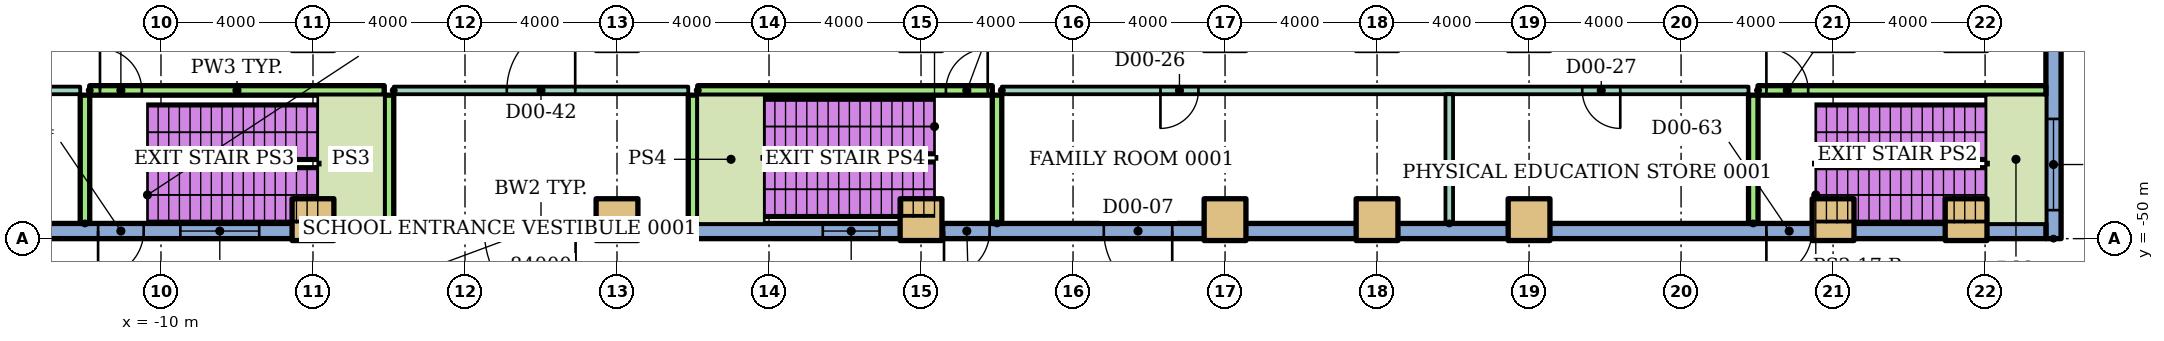
"""IFC4 building model, lengths in metres.
Left out: names, types, materials, properties, quantities, classifications, styles, units other than length and angle.
Written with IfcOpenShell. Run it as: python <this file> out.ifc"""

import sys

from ifc_helpers import new_model, si_unit, direction, frame, frame_2d, origin, origin_2d, place, context, subcontext, project, spatial, rectangle, extrude, element, fill, save


model = new_model("IFC4")
c1 = context("Model", 3, precision=1e-05, world=origin(), true_north=direction((0.0, 1.0)))
c2 = subcontext(c1, "Body", "Model", "MODEL_VIEW")
j1 = project(units=[si_unit("LENGTHUNIT", "METRE"), si_unit("PLANEANGLEUNIT", "RADIAN")], contexts=[c1])
p1 = place(None, origin())
s1 = spatial("IfcSite", under=j1, at=p1, CompositionType="ELEMENT")
p2 = place(p1, origin())
s2 = spatial("IfcBuilding", under=s1, at=p2, CompositionType="ELEMENT")
p3 = place(p2, origin())
s3 = spatial("IfcBuildingStorey", under=s2, at=p3, CompositionType="ELEMENT", Elevation=0.0)
for number, where in (
    (1, (-6.0, -49.5, 0.0)),
    (2, (2.0, -49.5, 0.0)),
    (3, (10.0, -49.5, 0.0)),
    (4, (18.0, -49.5, 0.0)),
    (5, (22.0, -49.5, 0.0)),
    (6, (26.0, -49.5, 0.0)),
    (7, (34.0, -49.5, 0.0)),
    (8, (37.5, -49.5, 0.0)),
):
    element("IfcColumn", number, at=place(p3, frame(where)), inside=s3, PredefinedType="COLUMN", context=c2, shape_type="SweptSolid", body=[
        extrude(rectangle(XDim=1.1, YDim=1.1, at=origin_2d()), origin(), (0.0, 0.0, 1.0), 6.0),
    ])
p4 = place(p3, frame((39.8, -50.0, 0.0), z_axis=(0.0, 0.0, 1.0), x_axis=(0.0, 1.0, 0.0)))
e9 = element("IfcWall", 9, at=p4, inside=s3, PredefinedType="STANDARD", context=c2, shape_type="SweptSolid", body=[
    extrude(rectangle(XDim=70.0, YDim=0.4, at=frame_2d((35.0, 0.0))), origin(), (0.0, 0.0, 1.0), 5.7),
])
p5 = place(p4, frame((17.933, 0.0, 0.0)))
e10 = element("IfcOpeningElement", 10, at=p5, cuts=e9, PredefinedType="OPENING", context=c2, shape_type="SweptSolid", body=[
    extrude(rectangle(XDim=1.8, YDim=2.4, at=frame_2d((0.9, 1.2))), frame((0.0, 0.21, 0.0), z_axis=(0.0, -1.0, 0.0), x_axis=(1.0, 0.0, 0.0)), (0.0, 0.0, 1.0), 0.42),
])
p6 = place(p4, frame((0.75, 0.0, 0.9)))
e11 = element("IfcOpeningElement", 11, at=p6, cuts=e9, PredefinedType="OPENING", context=c2, shape_type="SweptSolid", body=[
    extrude(rectangle(XDim=2.4, YDim=2.4, at=frame_2d((1.2, 1.2))), frame((0.0, 0.21, 0.0), z_axis=(0.0, -1.0, 0.0), x_axis=(1.0, 0.0, 0.0)), (0.0, 0.0, 1.0), 0.42),
])
p7 = place(p4, frame((21.3, 0.0, 0.9)))
e12 = element("IfcOpeningElement", 12, at=p7, cuts=e9, PredefinedType="OPENING", context=c2, shape_type="SweptSolid", body=[
    extrude(rectangle(XDim=2.4, YDim=2.4, at=frame_2d((1.2, 1.2))), frame((0.0, 0.21, 0.0), z_axis=(0.0, -1.0, 0.0), x_axis=(1.0, 0.0, 0.0)), (0.0, 0.0, 1.0), 0.42),
])
p8 = place(p4, frame((24.967, 0.0, 0.9)))
e13 = element("IfcOpeningElement", 13, at=p8, cuts=e9, PredefinedType="OPENING", context=c2, shape_type="SweptSolid", body=[
    extrude(rectangle(XDim=2.4, YDim=2.4, at=frame_2d((1.2, 1.2))), frame((0.0, 0.21, 0.0), z_axis=(0.0, -1.0, 0.0), x_axis=(1.0, 0.0, 0.0)), (0.0, 0.0, 1.0), 0.42),
])
p9 = place(p4, frame((32.988, 0.0, 0.9)))
e14 = element("IfcOpeningElement", 14, at=p9, cuts=e9, PredefinedType="OPENING", context=c2, shape_type="SweptSolid", body=[
    extrude(rectangle(XDim=2.4, YDim=2.4, at=frame_2d((1.2, 1.2))), frame((0.0, 0.21, 0.0), z_axis=(0.0, -1.0, 0.0), x_axis=(1.0, 0.0, 0.0)), (0.0, 0.0, 1.0), 0.42),
])
p10 = place(p4, frame((45.363, 0.0, 0.9)))
e15 = element("IfcOpeningElement", 15, at=p10, cuts=e9, PredefinedType="OPENING", context=c2, shape_type="SweptSolid", body=[
    extrude(rectangle(XDim=2.4, YDim=2.4, at=frame_2d((1.2, 1.2))), frame((0.0, 0.21, 0.0), z_axis=(0.0, -1.0, 0.0), x_axis=(1.0, 0.0, 0.0)), (0.0, 0.0, 1.0), 0.42),
])
p11 = place(p4, frame((49.488, 0.0, 0.9)))
e16 = element("IfcOpeningElement", 16, at=p11, cuts=e9, PredefinedType="OPENING", context=c2, shape_type="SweptSolid", body=[
    extrude(rectangle(XDim=2.4, YDim=2.4, at=frame_2d((1.2, 1.2))), frame((0.0, 0.21, 0.0), z_axis=(0.0, -1.0, 0.0), x_axis=(1.0, 0.0, 0.0)), (0.0, 0.0, 1.0), 0.42),
])
p12 = place(p4, frame((53.613, 0.0, 0.9)))
e17 = element("IfcOpeningElement", 17, at=p12, cuts=e9, PredefinedType="OPENING", context=c2, shape_type="SweptSolid", body=[
    extrude(rectangle(XDim=2.4, YDim=2.4, at=frame_2d((1.2, 1.2))), frame((0.0, 0.21, 0.0), z_axis=(0.0, -1.0, 0.0), x_axis=(1.0, 0.0, 0.0)), (0.0, 0.0, 1.0), 0.42),
])
p13 = place(p4, frame((57.738, 0.0, 0.9)))
e18 = element("IfcOpeningElement", 18, at=p13, cuts=e9, PredefinedType="OPENING", context=c2, shape_type="SweptSolid", body=[
    extrude(rectangle(XDim=2.4, YDim=2.4, at=frame_2d((1.2, 1.2))), frame((0.0, 0.21, 0.0), z_axis=(0.0, -1.0, 0.0), x_axis=(1.0, 0.0, 0.0)), (0.0, 0.0, 1.0), 0.42),
])
p14 = place(p4, frame((62.05, 0.0, 0.9)))
e19 = element("IfcOpeningElement", 19, at=p14, cuts=e9, PredefinedType="OPENING", context=c2, shape_type="SweptSolid", body=[
    extrude(rectangle(XDim=2.4, YDim=2.4, at=frame_2d((1.2, 1.2))), frame((0.0, 0.21, 0.0), z_axis=(0.0, -1.0, 0.0), x_axis=(1.0, 0.0, 0.0)), (0.0, 0.0, 1.0), 0.42),
])
p15 = place(p4, frame((66.55, 0.0, 0.9)))
e20 = element("IfcOpeningElement", 20, at=p15, cuts=e9, PredefinedType="OPENING", context=c2, shape_type="SweptSolid", body=[
    extrude(rectangle(XDim=2.4, YDim=2.4, at=frame_2d((1.2, 1.2))), frame((0.0, 0.21, 0.0), z_axis=(0.0, -1.0, 0.0), x_axis=(1.0, 0.0, 0.0)), (0.0, 0.0, 1.0), 0.42),
])
p16 = place(p4, frame((39.5, 0.0, 0.0)))
e21 = element("IfcOpeningElement", 21, at=p16, cuts=e9, PredefinedType="OPENING", context=c2, shape_type="SweptSolid", body=[
    extrude(rectangle(XDim=1.8, YDim=2.1, at=frame_2d((0.9, 1.05))), frame((0.0, 0.21, 0.0), z_axis=(0.0, -1.0, 0.0), x_axis=(1.0, 0.0, 0.0)), (0.0, 0.0, 1.0), 0.42),
])
p17 = place(p4, frame((28.3, 0.0, 0.0)))
e22 = element("IfcOpeningElement", 22, at=p17, cuts=e9, PredefinedType="OPENING", context=c2, shape_type="SweptSolid", body=[
    extrude(rectangle(XDim=1.8, YDim=2.1, at=frame_2d((0.9, 1.05))), frame((0.0, 0.21, 0.0), z_axis=(0.0, -1.0, 0.0), x_axis=(1.0, 0.0, 0.0)), (0.0, 0.0, 1.0), 0.42),
])
p18 = place(p3, frame((-39.6, -49.8, 0.0)))
e23 = element("IfcWall", 23, at=p18, inside=s3, PredefinedType="STANDARD", context=c2, shape_type="SweptSolid", body=[
    extrude(rectangle(XDim=79.2, YDim=0.4, at=frame_2d((39.6, 0.0))), origin(), (0.0, 0.0, 1.0), 5.7),
])
p19 = place(p18, frame((11.2, 0.0, 0.0)))
e24 = element("IfcOpeningElement", 24, at=p19, cuts=e23, PredefinedType="OPENING", context=c2, shape_type="SweptSolid", body=[
    extrude(rectangle(XDim=1.8, YDim=2.4, at=frame_2d((0.9, 1.2))), frame((0.0, 0.21, 0.0), z_axis=(0.0, -1.0, 0.0), x_axis=(1.0, 0.0, 0.0)), (0.0, 0.0, 1.0), 0.42),
])
p20 = place(p18, frame((38.11, 0.0, 0.0)))
e25 = element("IfcOpeningElement", 25, at=p20, cuts=e23, PredefinedType="OPENING", context=c2, shape_type="SweptSolid", body=[
    extrude(rectangle(XDim=2.4, YDim=2.4, at=frame_2d((1.2, 1.2))), frame((0.0, 0.21, 0.0), z_axis=(0.0, -1.0, 0.0), x_axis=(1.0, 0.0, 0.0)), (0.0, 0.0, 1.0), 0.42),
])
p21 = place(p18, frame((54.41, 0.0, 0.0)))
e26 = element("IfcOpeningElement", 26, at=p21, cuts=e23, PredefinedType="OPENING", context=c2, shape_type="SweptSolid", body=[
    extrude(rectangle(XDim=1.8, YDim=2.4, at=frame_2d((0.9, 1.2))), frame((0.0, 0.21, 0.0), z_axis=(0.0, -1.0, 0.0), x_axis=(1.0, 0.0, 0.0)), (0.0, 0.0, 1.0), 0.42),
])
p22 = place(p18, frame((22.11, 0.0, 0.9)))
e27 = element("IfcOpeningElement", 27, at=p22, cuts=e23, PredefinedType="OPENING", context=c2, shape_type="SweptSolid", body=[
    extrude(rectangle(XDim=2.4, YDim=2.4, at=frame_2d((1.2, 1.2))), frame((0.0, 0.21, 0.0), z_axis=(0.0, -1.0, 0.0), x_axis=(1.0, 0.0, 0.0)), (0.0, 0.0, 1.0), 0.42),
])
p23 = place(p18, frame((30.11, 0.0, 0.9)))
e28 = element("IfcOpeningElement", 28, at=p23, cuts=e23, PredefinedType="OPENING", context=c2, shape_type="SweptSolid", body=[
    extrude(rectangle(XDim=2.075, YDim=2.4, at=frame_2d((1.038, 1.2))), frame((0.0, 0.21, 0.0), z_axis=(0.0, -1.0, 0.0), x_axis=(1.0, 0.0, 0.0)), (0.0, 0.0, 1.0), 0.42),
])
p24 = place(p18, frame((47.015, 0.0, 0.9)))
e29 = element("IfcOpeningElement", 29, at=p24, cuts=e23, PredefinedType="OPENING", context=c2, shape_type="SweptSolid", body=[
    extrude(rectangle(XDim=1.495, YDim=2.4, at=frame_2d((0.748, 1.2))), frame((0.0, 0.21, 0.0), z_axis=(0.0, -1.0, 0.0), x_axis=(1.0, 0.0, 0.0)), (0.0, 0.0, 1.0), 0.42),
])
p25 = place(p18, frame((6.305, 0.0, 0.0)))
e30 = element("IfcOpeningElement", 30, at=p25, cuts=e23, PredefinedType="OPENING", context=c2, shape_type="SweptSolid", body=[
    extrude(rectangle(XDim=1.2, YDim=2.1, at=frame_2d((0.6, 1.05))), frame((0.0, 0.21, 0.0), z_axis=(0.0, -1.0, 0.0), x_axis=(1.0, 0.0, 0.0)), (0.0, 0.0, 1.0), 0.42),
])
p26 = place(p18, frame((71.845, 0.0, 0.0)))
e31 = element("IfcOpeningElement", 31, at=p26, cuts=e23, PredefinedType="OPENING", context=c2, shape_type="SweptSolid", body=[
    extrude(rectangle(XDim=1.2, YDim=2.1, at=frame_2d((0.6, 1.05))), frame((0.0, 0.21, 0.0), z_axis=(0.0, -1.0, 0.0), x_axis=(1.0, 0.0, 0.0)), (0.0, 0.0, 1.0), 0.42),
])
p27 = place(p18, frame((27.945, 0.0, 0.0)))
e32 = element("IfcOpeningElement", 32, at=p27, cuts=e23, PredefinedType="OPENING", context=c2, shape_type="SweptSolid", body=[
    extrude(rectangle(XDim=1.2, YDim=2.1, at=frame_2d((0.6, 1.05))), frame((0.0, 0.21, 0.0), z_axis=(0.0, -1.0, 0.0), x_axis=(1.0, 0.0, 0.0)), (0.0, 0.0, 1.0), 0.42),
])
p28 = place(p18, frame((50.205, 0.0, 0.0)))
e33 = element("IfcOpeningElement", 33, at=p28, cuts=e23, PredefinedType="OPENING", context=c2, shape_type="SweptSolid", body=[
    extrude(rectangle(XDim=1.2, YDim=2.1, at=frame_2d((0.6, 1.05))), frame((0.0, 0.21, 0.0), z_axis=(0.0, -1.0, 0.0), x_axis=(1.0, 0.0, 0.0)), (0.0, 0.0, 1.0), 0.42),
])
p29 = place(p3, frame((-31.775, -46.1, 0.0)))
e34 = element("IfcWall", 34, at=p29, inside=s3, PredefinedType="PARTITIONING", context=c2, shape_type="SweptSolid", body=[
    extrude(rectangle(XDim=19.65, YDim=0.2, at=frame_2d((9.825, 0.0))), origin(), (0.0, 0.0, 1.0), 5.7),
])
p30 = place(p29, frame((3.375, 0.0, 0.0)))
e35 = element("IfcOpeningElement", 35, at=p30, cuts=e34, PredefinedType="OPENING", context=c2, shape_type="SweptSolid", body=[
    extrude(rectangle(XDim=1.0, YDim=2.1, at=frame_2d((0.5, 1.05))), frame((0.0, 0.11, 0.0), z_axis=(0.0, -1.0, 0.0), x_axis=(1.0, 0.0, 0.0)), (0.0, 0.0, 1.0), 0.22),
])
p31 = place(p29, frame((13.325, 0.0, 0.0)))
e36 = element("IfcOpeningElement", 36, at=p31, cuts=e34, PredefinedType="OPENING", context=c2, shape_type="SweptSolid", body=[
    extrude(rectangle(XDim=1.0, YDim=2.1, at=frame_2d((0.5, 1.05))), frame((0.0, 0.11, 0.0), z_axis=(0.0, -1.0, 0.0), x_axis=(1.0, 0.0, 0.0)), (0.0, 0.0, 1.0), 0.22),
])
p32 = place(p3, frame((-3.875, -46.1, 0.0)))
e37 = element("IfcWall", 37, at=p32, inside=s3, PredefinedType="PARTITIONING", context=c2, shape_type="SweptSolid", body=[
    extrude(rectangle(XDim=7.75, YDim=0.2, at=frame_2d((3.875, 0.0))), origin(), (0.0, 0.0, 1.0), 5.7),
])
p33 = place(p32, frame((2.975, 0.0, 0.0)))
e38 = element("IfcOpeningElement", 38, at=p33, cuts=e37, PredefinedType="OPENING", context=c2, shape_type="SweptSolid", body=[
    extrude(rectangle(XDim=1.8, YDim=2.1, at=frame_2d((0.9, 1.05))), frame((0.0, 0.11, 0.0), z_axis=(0.0, -1.0, 0.0), x_axis=(1.0, 0.0, 0.0)), (0.0, 0.0, 1.0), 0.22),
])
p34 = place(p3, frame((12.125, -46.1, 0.0)))
e39 = element("IfcWall", 39, at=p34, inside=s3, PredefinedType="PARTITIONING", context=c2, shape_type="SweptSolid", body=[
    extrude(rectangle(XDim=19.65, YDim=0.2, at=frame_2d((9.825, 0.0))), origin(), (0.0, 0.0, 1.0), 5.7),
])
p35 = place(p34, frame((4.175, 0.0, 0.0)))
e40 = element("IfcOpeningElement", 40, at=p35, cuts=e39, PredefinedType="OPENING", context=c2, shape_type="SweptSolid", body=[
    extrude(rectangle(XDim=1.0, YDim=2.1, at=frame_2d((0.5, 1.05))), frame((0.0, 0.11, 0.0), z_axis=(0.0, -1.0, 0.0), x_axis=(1.0, 0.0, 0.0)), (0.0, 0.0, 1.0), 0.22),
])
p36 = place(p34, frame((15.275, 0.0, 0.0)))
e41 = element("IfcOpeningElement", 41, at=p36, cuts=e39, PredefinedType="OPENING", context=c2, shape_type="SweptSolid", body=[
    extrude(rectangle(XDim=1.0, YDim=2.1, at=frame_2d((0.5, 1.05))), frame((0.0, 0.11, 0.0), z_axis=(0.0, -1.0, 0.0), x_axis=(1.0, 0.0, 0.0)), (0.0, 0.0, 1.0), 0.22),
])
p37 = place(p3, frame((-11.875, -46.1, 0.0)))
e42 = element("IfcWall", 42, at=p37, inside=s3, PredefinedType="SOLIDWALL", context=c2, shape_type="SweptSolid", body=[
    extrude(rectangle(XDim=7.75, YDim=0.25, at=frame_2d((3.875, 0.0))), origin(), (0.0, 0.0, 1.0), 5.7),
])
p38 = place(p37, frame((0.27, 0.0, 0.0)))
e43 = element("IfcOpeningElement", 43, at=p38, cuts=e42, PredefinedType="OPENING", context=c2, shape_type="SweptSolid", body=[
    extrude(rectangle(XDim=1.1, YDim=2.1, at=frame_2d((0.55, 1.05))), frame((0.0, 0.135, 0.0), z_axis=(0.0, -1.0, 0.0), x_axis=(1.0, 0.0, 0.0)), (0.0, 0.0, 1.0), 0.27),
])
p39 = place(p3, frame((4.125, -46.1, 0.0)))
e44 = element("IfcWall", 44, at=p39, inside=s3, PredefinedType="SOLIDWALL", context=c2, shape_type="SweptSolid", body=[
    extrude(rectangle(XDim=7.75, YDim=0.25, at=frame_2d((3.875, 0.0))), origin(), (0.0, 0.0, 1.0), 5.7),
])
p40 = place(p39, frame((6.53, 0.0, 0.0)))
e45 = element("IfcOpeningElement", 45, at=p40, cuts=e44, PredefinedType="OPENING", context=c2, shape_type="SweptSolid", body=[
    extrude(rectangle(XDim=1.1, YDim=2.1, at=frame_2d((0.55, 1.05))), frame((0.0, 0.135, 0.0), z_axis=(0.0, -1.0, 0.0), x_axis=(1.0, 0.0, 0.0)), (0.0, 0.0, 1.0), 0.27),
])
p41 = place(p3, frame((32.025, -46.1, 0.0)))
e46 = element("IfcWall", 46, at=p41, inside=s3, PredefinedType="SOLIDWALL", context=c2, shape_type="SweptSolid", body=[
    extrude(rectangle(XDim=7.575, YDim=0.25, at=frame_2d((3.788, 0.0))), origin(), (0.0, 0.0, 1.0), 5.7),
])
p42 = place(p41, frame((0.22, 0.0, 0.0)))
e47 = element("IfcOpeningElement", 47, at=p42, cuts=e46, PredefinedType="OPENING", context=c2, shape_type="SweptSolid", body=[
    extrude(rectangle(XDim=1.1, YDim=2.1, at=frame_2d((0.55, 1.05))), frame((0.0, 0.135, 0.0), z_axis=(0.0, -1.0, 0.0), x_axis=(1.0, 0.0, 0.0)), (0.0, 0.0, 1.0), 0.27),
])
for number, where, z_axis, x_axis in (
    (48, (-12.0, -49.6, 0.0), (0.0, 0.0, 1.0), (0.0, 1.0, 0.0)),
    (49, (-4.0, -49.6, 0.0), (0.0, 0.0, 1.0), (0.0, 1.0, 0.0)),
    (50, (4.0, -49.6, 0.0), (0.0, 0.0, 1.0), (0.0, 1.0, 0.0)),
    (51, (12.0, -49.6, 0.0), (0.0, 0.0, 1.0), (0.0, 1.0, 0.0)),
):
    element("IfcWall", number, at=place(p3, frame(where, z_axis=z_axis, x_axis=x_axis)), inside=s3, PredefinedType="SOLIDWALL", context=c2, shape_type="SweptSolid", body=[
        extrude(rectangle(XDim=3.375, YDim=0.25, at=frame_2d((1.688, 0.0))), origin(), (0.0, 0.0, 1.0), 5.7),
    ])
p43 = place(p3, frame((23.9, -49.6, 0.0), z_axis=(0.0, 0.0, 1.0), x_axis=(0.0, 1.0, 0.0)))
e52 = element("IfcWall", 52, at=p43, inside=s3, PredefinedType="PARTITIONING", context=c2, shape_type="SweptSolid", body=[
    extrude(rectangle(XDim=3.4, YDim=0.2, at=frame_2d((1.7, 0.0))), origin(), (0.0, 0.0, 1.0), 5.7),
])
p44 = place(p3, frame((31.9, -49.6, 0.0), z_axis=(0.0, 0.0, 1.0), x_axis=(0.0, 1.0, 0.0)))
e53 = element("IfcWall", 53, at=p44, inside=s3, PredefinedType="SOLIDWALL", context=c2, shape_type="SweptSolid", body=[
    extrude(rectangle(XDim=3.375, YDim=0.25, at=frame_2d((1.688, 0.0))), origin(), (0.0, 0.0, 1.0), 5.7),
])
p45 = place(p6, origin())
e54 = element("IfcWindow", 54, at=p45, inside=s3, PartitioningType="SINGLE_PANEL", PredefinedType="WINDOW", context=c2, shape_type="SweptSolid", body=[
    extrude(rectangle(XDim=2.4, YDim=2.4, at=frame_2d((1.2, 1.2))), frame((0.0, 0.03, 0.0), z_axis=(0.0, -1.0, 0.0), x_axis=(1.0, 0.0, 0.0)), (0.0, 0.0, 1.0), 0.06),
])
fill(e11, e54)
p46 = place(p20, frame((2.4, 0.0, 0.0), z_axis=(0.0, 0.0, 1.0), x_axis=(-1.0, 0.0, 0.0)))
e55 = element("IfcDoor", 55, at=p46, inside=s3, OperationType="DOUBLE_DOOR_SINGLE_SWING", PredefinedType="DOOR", context=c2, shape_type="SweptSolid", body=[
    extrude(rectangle(XDim=2.4, YDim=2.4, at=frame_2d((1.2, 1.2))), frame((0.0, 0.025, 0.0), z_axis=(0.0, -1.0, 0.0), x_axis=(1.0, 0.0, 0.0)), (0.0, 0.0, 1.0), 0.05),
])
fill(e25, e55)
p47 = place(p21, frame((1.8, 0.0, 0.0), z_axis=(0.0, 0.0, 1.0), x_axis=(-1.0, 0.0, 0.0)))
e56 = element("IfcDoor", 56, at=p47, inside=s3, OperationType="DOUBLE_DOOR_SINGLE_SWING", PredefinedType="DOOR", context=c2, shape_type="SweptSolid", body=[
    extrude(rectangle(XDim=1.8, YDim=2.4, at=frame_2d((0.9, 1.2))), frame((0.0, 0.025, 0.0), z_axis=(0.0, -1.0, 0.0), x_axis=(1.0, 0.0, 0.0)), (0.0, 0.0, 1.0), 0.05),
])
fill(e26, e56)
p48 = place(p23, origin())
e57 = element("IfcWindow", 57, at=p48, inside=s3, PartitioningType="SINGLE_PANEL", PredefinedType="WINDOW", context=c2, shape_type="SweptSolid", body=[
    extrude(rectangle(XDim=2.075, YDim=2.4, at=frame_2d((1.038, 1.2))), frame((0.0, 0.03, 0.0), z_axis=(0.0, -1.0, 0.0), x_axis=(1.0, 0.0, 0.0)), (0.0, 0.0, 1.0), 0.06),
])
fill(e28, e57)
p49 = place(p24, origin())
e58 = element("IfcWindow", 58, at=p49, inside=s3, PartitioningType="SINGLE_PANEL", PredefinedType="WINDOW", context=c2, shape_type="SweptSolid", body=[
    extrude(rectangle(XDim=1.495, YDim=2.4, at=frame_2d((0.748, 1.2))), frame((0.0, 0.03, 0.0), z_axis=(0.0, -1.0, 0.0), x_axis=(1.0, 0.0, 0.0)), (0.0, 0.0, 1.0), 0.06),
])
fill(e29, e58)
p50 = place(p35, frame((1.0, 0.0, 0.0), z_axis=(0.0, 0.0, 1.0), x_axis=(-1.0, 0.0, 0.0)))
e59 = element("IfcDoor", 59, at=p50, inside=s3, OperationType="SINGLE_SWING_LEFT", PredefinedType="DOOR", context=c2, shape_type="SweptSolid", body=[
    extrude(rectangle(XDim=1.0, YDim=2.1, at=frame_2d((0.5, 1.05))), frame((0.0, 0.025, 0.0), z_axis=(0.0, -1.0, 0.0), x_axis=(1.0, 0.0, 0.0)), (0.0, 0.0, 1.0), 0.05),
])
fill(e40, e59)
p51 = place(p36, frame((1.0, 0.0, 0.0), z_axis=(0.0, 0.0, 1.0), x_axis=(-1.0, 0.0, 0.0)))
e60 = element("IfcDoor", 60, at=p51, inside=s3, OperationType="SINGLE_SWING_RIGHT", PredefinedType="DOOR", context=c2, shape_type="SweptSolid", body=[
    extrude(rectangle(XDim=1.0, YDim=2.1, at=frame_2d((0.5, 1.05))), frame((0.0, 0.025, 0.0), z_axis=(0.0, -1.0, 0.0), x_axis=(1.0, 0.0, 0.0)), (0.0, 0.0, 1.0), 0.05),
])
fill(e41, e60)
p52 = place(p33, origin())
e61 = element("IfcDoor", 61, at=p52, inside=s3, OperationType="DOUBLE_DOOR_SINGLE_SWING", PredefinedType="DOOR", context=c2, shape_type="SweptSolid", body=[
    extrude(rectangle(XDim=1.8, YDim=2.1, at=frame_2d((0.9, 1.05))), frame((0.0, 0.025, 0.0), z_axis=(0.0, -1.0, 0.0), x_axis=(1.0, 0.0, 0.0)), (0.0, 0.0, 1.0), 0.05),
])
fill(e38, e61)
p53 = place(p42, origin())
e62 = element("IfcDoor", 62, at=p53, inside=s3, OperationType="SINGLE_SWING_LEFT", PredefinedType="DOOR", context=c2, shape_type="SweptSolid", body=[
    extrude(rectangle(XDim=1.1, YDim=2.1, at=frame_2d((0.55, 1.05))), frame((0.0, 0.025, 0.0), z_axis=(0.0, -1.0, 0.0), x_axis=(1.0, 0.0, 0.0)), (0.0, 0.0, 1.0), 0.05),
])
fill(e47, e62)
p54 = place(p38, origin())
e63 = element("IfcDoor", 63, at=p54, inside=s3, OperationType="SINGLE_SWING_LEFT", PredefinedType="DOOR", context=c2, shape_type="SweptSolid", body=[
    extrude(rectangle(XDim=1.1, YDim=2.1, at=frame_2d((0.55, 1.05))), frame((0.0, 0.025, 0.0), z_axis=(0.0, -1.0, 0.0), x_axis=(1.0, 0.0, 0.0)), (0.0, 0.0, 1.0), 0.05),
])
fill(e43, e63)
p55 = place(p40, origin())
e64 = element("IfcDoor", 64, at=p55, inside=s3, OperationType="SINGLE_SWING_RIGHT", PredefinedType="DOOR", context=c2, shape_type="SweptSolid", body=[
    extrude(rectangle(XDim=1.1, YDim=2.1, at=frame_2d((0.55, 1.05))), frame((0.0, 0.025, 0.0), z_axis=(0.0, -1.0, 0.0), x_axis=(1.0, 0.0, 0.0)), (0.0, 0.0, 1.0), 0.05),
])
fill(e45, e64)
p56 = place(p26, frame((1.2, 0.0, 0.0), z_axis=(0.0, 0.0, 1.0), x_axis=(-1.0, 0.0, 0.0)))
e65 = element("IfcDoor", 65, at=p56, inside=s3, OperationType="SINGLE_SWING_LEFT", PredefinedType="DOOR", context=c2, shape_type="SweptSolid", body=[
    extrude(rectangle(XDim=1.2, YDim=2.1, at=frame_2d((0.6, 1.05))), frame((0.0, 0.025, 0.0), z_axis=(0.0, -1.0, 0.0), x_axis=(1.0, 0.0, 0.0)), (0.0, 0.0, 1.0), 0.05),
])
fill(e31, e65)
p57 = place(p27, frame((1.2, 0.0, 0.0), z_axis=(0.0, 0.0, 1.0), x_axis=(-1.0, 0.0, 0.0)))
e66 = element("IfcDoor", 66, at=p57, inside=s3, OperationType="SINGLE_SWING_LEFT", PredefinedType="DOOR", context=c2, shape_type="SweptSolid", body=[
    extrude(rectangle(XDim=1.2, YDim=2.1, at=frame_2d((0.6, 1.05))), frame((0.0, 0.025, 0.0), z_axis=(0.0, -1.0, 0.0), x_axis=(1.0, 0.0, 0.0)), (0.0, 0.0, 1.0), 0.05),
])
fill(e32, e66)
p58 = place(p28, frame((1.2, 0.0, 0.0), z_axis=(0.0, 0.0, 1.0), x_axis=(-1.0, 0.0, 0.0)))
e67 = element("IfcDoor", 67, at=p58, inside=s3, OperationType="SINGLE_SWING_LEFT", PredefinedType="DOOR", context=c2, shape_type="SweptSolid", body=[
    extrude(rectangle(XDim=1.2, YDim=2.1, at=frame_2d((0.6, 1.05))), frame((0.0, 0.025, 0.0), z_axis=(0.0, -1.0, 0.0), x_axis=(1.0, 0.0, 0.0)), (0.0, 0.0, 1.0), 0.05),
])
fill(e33, e67)
save(model, sys.argv[1])
